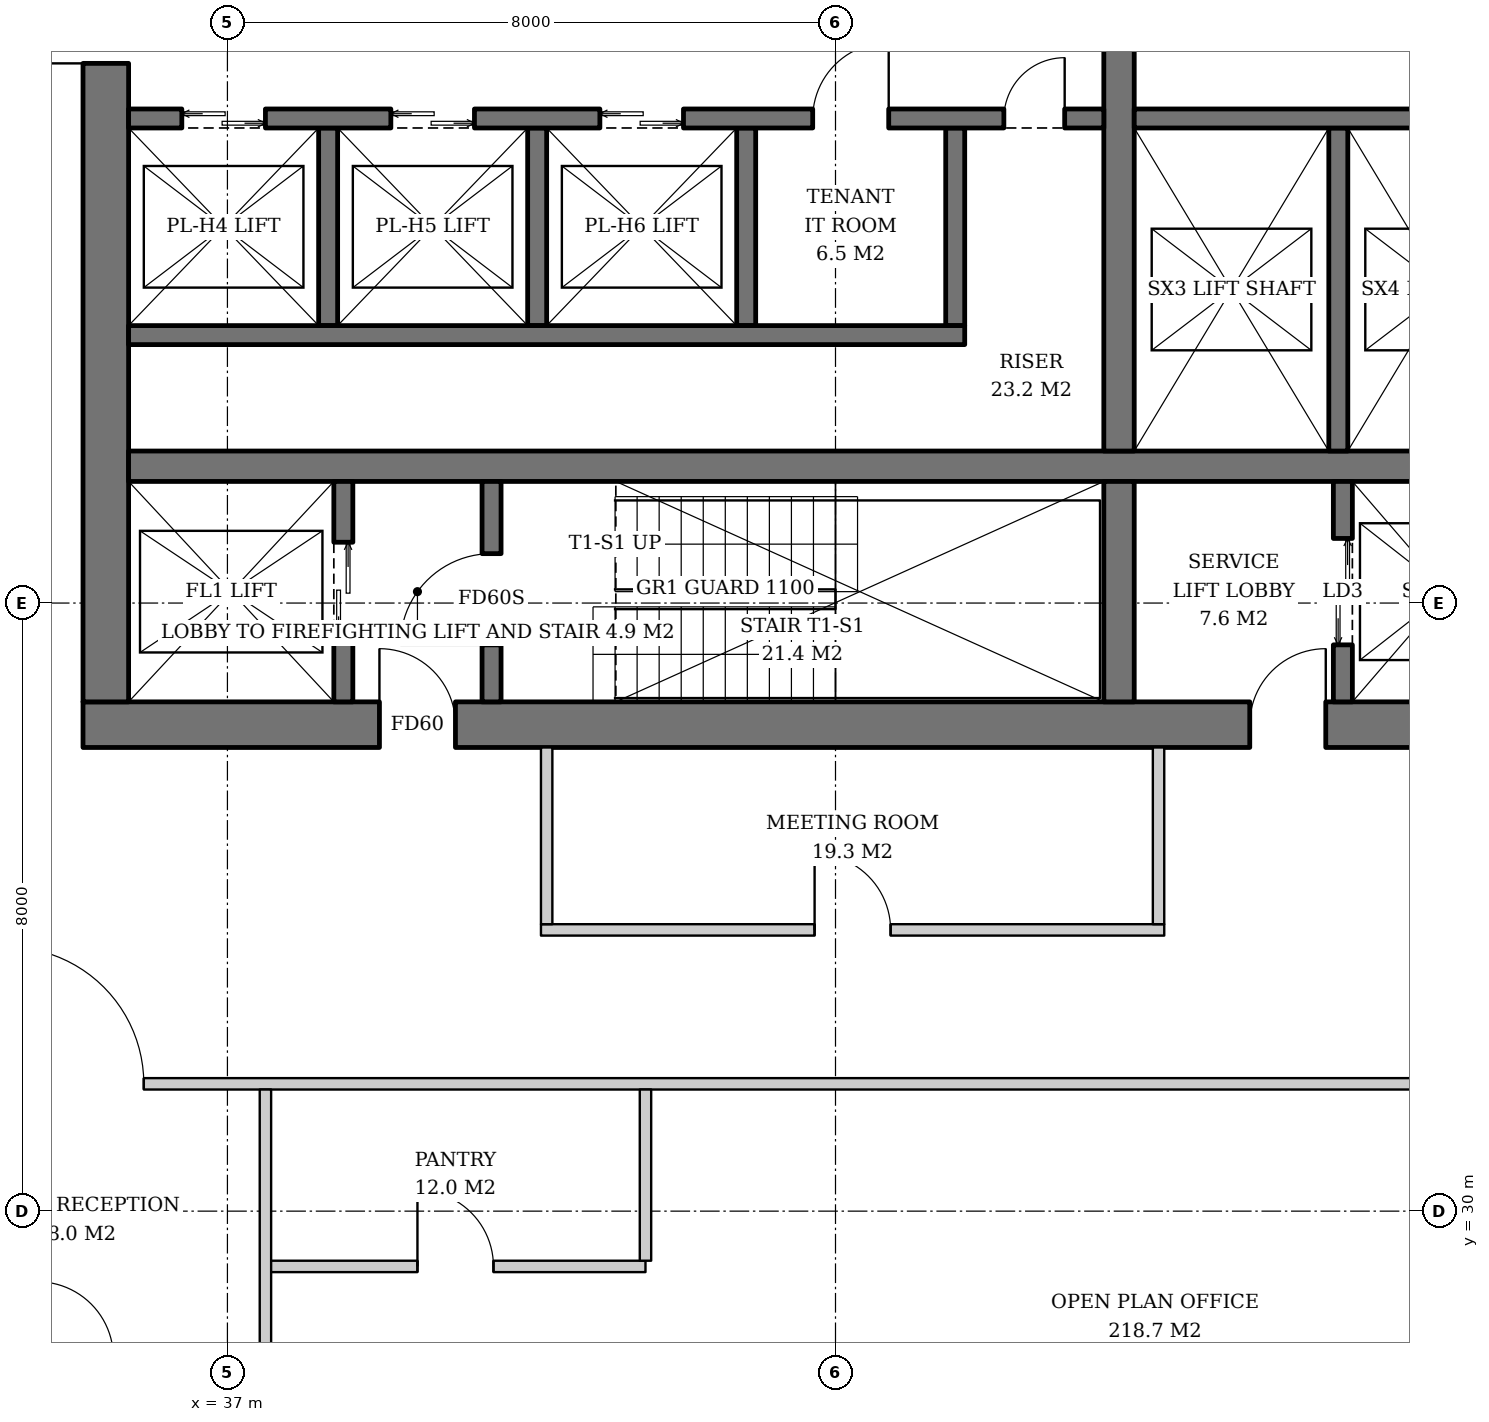
"""IFC4 building model, lengths in metres.
Left out: names, types, materials, properties, quantities, classifications, styles, units other than length and angle.
Written with IfcOpenShell. Run it as: python <this file> out.ifc"""

import sys

from ifc_helpers import new_model, si_unit, direction, frame, frame_2d, origin, place, context, subcontext, project, spatial, rectangle, extrude, element, fill, save


model = new_model("IFC4")
c1 = context("Model", 3, precision=1e-05, world=origin(), true_north=direction((0.0, 1.0)))
c2 = subcontext(c1, "Body", "Model", "MODEL_VIEW")
j1 = project(units=[si_unit("LENGTHUNIT", "METRE"), si_unit("PLANEANGLEUNIT", "RADIAN")], contexts=[c1])
p1 = place(None, origin())
s1 = spatial("IfcSite", under=j1, at=p1, CompositionType="ELEMENT")
p2 = place(p1, origin())
s2 = spatial("IfcBuilding", under=s1, at=p2, CompositionType="ELEMENT")
p3 = place(p2, frame((0.0, 0.0, 176.8)))
s3 = spatial("IfcBuildingStorey", under=s2, at=p3, CompositionType="ELEMENT", Elevation=176.8)
p4 = place(p3, frame((35.1, 36.4, 0.0), z_axis=(0.0, 0.0, 1.0), x_axis=(1.0, 0.0, 0.0)))
e1 = element("IfcWall", 1, at=p4, inside=s3, PredefinedType="SHEAR", context=c2, shape_type="SweptSolid", body=[
    extrude(rectangle(XDim=19.8, YDim=0.6, at=frame_2d((9.9, 0.0))), origin(), (0.0, 0.0, 1.0), 3.8),
])
p5 = place(p4, frame((3.9, 0.0, 0.0)))
e2 = element("IfcOpeningElement", 2, at=p5, cuts=e1, PredefinedType="OPENING", context=c2, shape_type="SweptSolid", body=[
    extrude(rectangle(XDim=1.0, YDim=2.1, at=frame_2d((0.5, 1.05))), frame((0.0, 0.31, 0.0), z_axis=(0.0, -1.0, 0.0), x_axis=(1.0, 0.0, 0.0)), (0.0, 0.0, 1.0), 0.62),
])
p6 = place(p4, frame((15.35, 0.0, 0.0)))
e3 = element("IfcOpeningElement", 3, at=p6, cuts=e1, PredefinedType="OPENING", context=c2, shape_type="SweptSolid", body=[
    extrude(rectangle(XDim=1.0, YDim=2.1, at=frame_2d((0.5, 1.05))), frame((0.0, 0.31, 0.0), z_axis=(0.0, -1.0, 0.0), x_axis=(1.0, 0.0, 0.0)), (0.0, 0.0, 1.0), 0.62),
])
p7 = place(p3, frame((35.4, 36.7, 0.0), z_axis=(0.0, 0.0, 1.0), x_axis=(0.0, 1.0, 0.0)))
e4 = element("IfcWall", 4, at=p7, inside=s3, PredefinedType="SHEAR", context=c2, shape_type="SweptSolid", body=[
    extrude(rectangle(XDim=18.6, YDim=0.6, at=frame_2d((9.3, 0.0))), origin(), (0.0, 0.0, 1.0), 3.8),
])
p8 = place(p7, frame((8.4, 0.0, 0.0)))
e5 = element("IfcOpeningElement", 5, at=p8, cuts=e4, PredefinedType="OPENING", context=c2, shape_type="SweptSolid", body=[
    extrude(rectangle(XDim=1.8, YDim=2.4, at=frame_2d((0.9, 1.2))), frame((0.0, 0.31, 0.0), z_axis=(0.0, -1.0, 0.0), x_axis=(1.0, 0.0, 0.0)), (0.0, 0.0, 1.0), 0.62),
])
p9 = place(p3, frame((35.7, 39.8, 0.0), z_axis=(0.0, 0.0, 1.0), x_axis=(1.0, 0.0, 0.0)))
e6 = element("IfcWall", 6, at=p9, inside=s3, PredefinedType="SHEAR", context=c2, shape_type="SweptSolid", body=[
    extrude(rectangle(XDim=18.6, YDim=0.4, at=frame_2d((9.3, 0.0))), origin(), (0.0, 0.0, 1.0), 3.8),
])
p10 = place(p3, frame((48.73, 36.7, 0.0), z_axis=(0.0, 0.0, 1.0), x_axis=(0.0, 1.0, 0.0)))
e7 = element("IfcWall", 7, at=p10, inside=s3, PredefinedType="SHEAR", context=c2, shape_type="SweptSolid", body=[
    extrude(rectangle(XDim=2.9, YDim=0.4, at=frame_2d((1.45, 0.0))), origin(), (0.0, 0.0, 1.0), 3.8),
])
p11 = place(p3, frame((48.73, 40.0, 0.0), z_axis=(0.0, 0.0, 1.0), x_axis=(0.0, 1.0, 0.0)))
e8 = element("IfcWall", 8, at=p11, inside=s3, PredefinedType="SHEAR", context=c2, shape_type="SweptSolid", body=[
    extrude(rectangle(XDim=12.0, YDim=0.4, at=frame_2d((6.0, 0.0))), origin(), (0.0, 0.0, 1.0), 3.8),
])
p12 = place(p3, frame((38.525, 36.7, 0.0), z_axis=(0.0, 0.0, 1.0), x_axis=(0.0, 1.0, 0.0)))
e9 = element("IfcWall", 9, at=p12, inside=s3, PredefinedType="SHEAR", context=c2, shape_type="SweptSolid", body=[
    extrude(rectangle(XDim=2.9, YDim=0.25, at=frame_2d((1.45, 0.0))), origin(), (0.0, 0.0, 1.0), 3.8),
])
p13 = place(p12, frame((0.8, 0.0, 0.0)))
e10 = element("IfcOpeningElement", 10, at=p13, cuts=e9, PredefinedType="OPENING", context=c2, shape_type="SweptSolid", body=[
    extrude(rectangle(XDim=1.3, YDim=2.2, at=frame_2d((0.65, 1.1))), frame((0.0, 0.135, 0.0), z_axis=(0.0, -1.0, 0.0), x_axis=(1.0, 0.0, 0.0)), (0.0, 0.0, 1.0), 0.27),
])
p14 = place(p3, frame((40.475, 36.7, 0.0), z_axis=(0.0, 0.0, 1.0), x_axis=(0.0, 1.0, 0.0)))
e11 = element("IfcWall", 11, at=p14, inside=s3, PredefinedType="SHEAR", context=c2, shape_type="SweptSolid", body=[
    extrude(rectangle(XDim=2.9, YDim=0.25, at=frame_2d((1.45, 0.0))), origin(), (0.0, 0.0, 1.0), 3.8),
])
p15 = place(p14, frame((0.75, 0.0, 0.0)))
e12 = element("IfcOpeningElement", 12, at=p15, cuts=e11, PredefinedType="OPENING", context=c2, shape_type="SweptSolid", body=[
    extrude(rectangle(XDim=1.2, YDim=2.1, at=frame_2d((0.6, 1.05))), frame((0.0, 0.135, 0.0), z_axis=(0.0, -1.0, 0.0), x_axis=(1.0, 0.0, 0.0)), (0.0, 0.0, 1.0), 0.27),
])
p16 = place(p3, frame((51.675, 36.7, 0.0), z_axis=(0.0, 0.0, 1.0), x_axis=(0.0, 1.0, 0.0)))
e13 = element("IfcWall", 13, at=p16, inside=s3, PredefinedType="SHEAR", context=c2, shape_type="SweptSolid", body=[
    extrude(rectangle(XDim=2.9, YDim=0.25, at=frame_2d((1.45, 0.0))), origin(), (0.0, 0.0, 1.0), 3.8),
])
p17 = place(p16, frame((0.75, 0.0, 0.0)))
e14 = element("IfcOpeningElement", 14, at=p17, cuts=e13, PredefinedType="OPENING", context=c2, shape_type="SweptSolid", body=[
    extrude(rectangle(XDim=1.4, YDim=2.4, at=frame_2d((0.7, 1.2))), frame((0.0, 0.135, 0.0), z_axis=(0.0, -1.0, 0.0), x_axis=(1.0, 0.0, 0.0)), (0.0, 0.0, 1.0), 0.27),
])
for number, where, z_axis, x_axis in (
    (15, (38.325, 44.25, 0.0), (0.0, 0.0, 1.0), (0.0, -1.0, 0.0)),
    (16, (41.075, 44.25, 0.0), (0.0, 0.0, 1.0), (0.0, -1.0, 0.0)),
    (17, (43.825, 44.25, 0.0), (0.0, 0.0, 1.0), (0.0, -1.0, 0.0)),
    (18, (46.575, 44.25, 0.0), (0.0, 0.0, 1.0), (0.0, -1.0, 0.0)),
):
    element("IfcWall", number, at=place(p3, frame(where, z_axis=z_axis, x_axis=x_axis)), inside=s3, PredefinedType="SHEAR", context=c2, shape_type="SweptSolid", body=[
        extrude(rectangle(XDim=2.6, YDim=0.25, at=frame_2d((1.3, 0.0))), origin(), (0.0, 0.0, 1.0), 3.8),
    ])
p18 = place(p3, frame((35.7, 41.525, 0.0), z_axis=(0.0, 0.0, 1.0), x_axis=(1.0, 0.0, 0.0)))
e19 = element("IfcWall", 19, at=p18, inside=s3, PredefinedType="SHEAR", context=c2, shape_type="SweptSolid", body=[
    extrude(rectangle(XDim=11.0, YDim=0.25, at=frame_2d((5.5, 0.0))), origin(), (0.0, 0.0, 1.0), 3.8),
])
p19 = place(p3, frame((35.7, 44.375, 0.0), z_axis=(0.0, 0.0, 1.0), x_axis=(1.0, 0.0, 0.0)))
e20 = element("IfcWall", 20, at=p19, inside=s3, PredefinedType="SHEAR", context=c2, shape_type="SweptSolid", body=[
    extrude(rectangle(XDim=12.83, YDim=0.25, at=frame_2d((6.415, 0.0))), origin(), (0.0, 0.0, 1.0), 3.8),
])
p20 = place(p19, frame((0.7, 0.0, 0.0)))
e21 = element("IfcOpeningElement", 21, at=p20, cuts=e20, PredefinedType="OPENING", context=c2, shape_type="SweptSolid", body=[
    extrude(rectangle(XDim=1.1, YDim=2.2, at=frame_2d((0.55, 1.1))), frame((0.0, 0.135, 0.0), z_axis=(0.0, -1.0, 0.0), x_axis=(1.0, 0.0, 0.0)), (0.0, 0.0, 1.0), 0.27),
])
p21 = place(p19, frame((3.45, 0.0, 0.0)))
e22 = element("IfcOpeningElement", 22, at=p21, cuts=e20, PredefinedType="OPENING", context=c2, shape_type="SweptSolid", body=[
    extrude(rectangle(XDim=1.1, YDim=2.2, at=frame_2d((0.55, 1.1))), frame((0.0, 0.135, 0.0), z_axis=(0.0, -1.0, 0.0), x_axis=(1.0, 0.0, 0.0)), (0.0, 0.0, 1.0), 0.27),
])
p22 = place(p19, frame((6.2, 0.0, 0.0)))
e23 = element("IfcOpeningElement", 23, at=p22, cuts=e20, PredefinedType="OPENING", context=c2, shape_type="SweptSolid", body=[
    extrude(rectangle(XDim=1.1, YDim=2.2, at=frame_2d((0.55, 1.1))), frame((0.0, 0.135, 0.0), z_axis=(0.0, -1.0, 0.0), x_axis=(1.0, 0.0, 0.0)), (0.0, 0.0, 1.0), 0.27),
])
p23 = place(p19, frame((9.0, 0.0, 0.0)))
e24 = element("IfcOpeningElement", 24, at=p23, cuts=e20, PredefinedType="OPENING", context=c2, shape_type="SweptSolid", body=[
    extrude(rectangle(XDim=1.0, YDim=2.1, at=frame_2d((0.5, 1.05))), frame((0.0, 0.135, 0.0), z_axis=(0.0, -1.0, 0.0), x_axis=(1.0, 0.0, 0.0)), (0.0, 0.0, 1.0), 0.27),
])
p24 = place(p19, frame((11.515, 0.0, 0.0)))
e25 = element("IfcOpeningElement", 25, at=p24, cuts=e20, PredefinedType="OPENING", context=c2, shape_type="SweptSolid", body=[
    extrude(rectangle(XDim=0.8, YDim=2.0, at=frame_2d((0.4, 1.0))), frame((0.0, 0.135, 0.0), z_axis=(0.0, -1.0, 0.0), x_axis=(1.0, 0.0, 0.0)), (0.0, 0.0, 1.0), 0.27),
])
p25 = place(p3, frame((51.615, 44.25, 0.0), z_axis=(0.0, 0.0, 1.0), x_axis=(0.0, -1.0, 0.0)))
e26 = element("IfcWall", 26, at=p25, inside=s3, PredefinedType="SHEAR", context=c2, shape_type="SweptSolid", body=[
    extrude(rectangle(XDim=4.25, YDim=0.25, at=frame_2d((2.125, 0.0))), origin(), (0.0, 0.0, 1.0), 3.8),
])
p26 = place(p3, frame((48.93, 44.375, 0.0), z_axis=(0.0, 0.0, 1.0), x_axis=(1.0, 0.0, 0.0)))
e27 = element("IfcWall", 27, at=p26, inside=s3, PredefinedType="SHEAR", context=c2, shape_type="SweptSolid", body=[
    extrude(rectangle(XDim=5.37, YDim=0.25, at=frame_2d((2.685, 0.0))), origin(), (0.0, 0.0, 1.0), 3.8),
])
p27 = place(p3, frame((41.125, 33.7, 0.0), z_axis=(0.0, 0.0, 1.0), x_axis=(1.0, 0.0, 0.0)))
e28 = element("IfcWall", 28, at=p27, inside=s3, PredefinedType="PARTITIONING", context=c2, shape_type="SweptSolid", body=[
    extrude(rectangle(XDim=8.2, YDim=0.15, at=frame_2d((4.1, 0.0))), origin(), (0.0, 0.0, 1.0), 2.867),
])
p28 = place(p27, frame((3.6, 0.0, 0.0)))
e29 = element("IfcOpeningElement", 29, at=p28, cuts=e28, PredefinedType="OPENING", context=c2, shape_type="SweptSolid", body=[
    extrude(rectangle(XDim=1.0, YDim=2.1, at=frame_2d((0.5, 1.05))), frame((0.0, 0.085, 0.0), z_axis=(0.0, -1.0, 0.0), x_axis=(1.0, 0.0, 0.0)), (0.0, 0.0, 1.0), 0.17),
])
for number, where, z_axis, x_axis in (
    (30, (41.2, 36.1, 0.0), (0.0, 0.0, 1.0), (0.0, -1.0, 0.0)),
    (31, (49.25, 36.1, 0.0), (0.0, 0.0, 1.0), (0.0, -1.0, 0.0)),
):
    element("IfcWall", number, at=place(p3, frame(where, z_axis=z_axis, x_axis=x_axis)), inside=s3, PredefinedType="PARTITIONING", context=c2, shape_type="SweptSolid", body=[
        extrude(rectangle(XDim=2.325, YDim=0.15, at=frame_2d((1.163, 0.0))), origin(), (0.0, 0.0, 1.0), 3.62),
    ])
p29 = place(p3, frame((31.214, 31.675, 0.0), z_axis=(0.0, 0.0, 1.0), x_axis=(1.0, 0.0, 0.0)))
e32 = element("IfcWall", 32, at=p29, inside=s3, PredefinedType="PARTITIONING", context=c2, shape_type="SweptSolid", body=[
    extrude(rectangle(XDim=27.572, YDim=0.15, at=frame_2d((13.786, 0.0))), origin(), (0.0, 0.0, 1.0), 2.867),
])
p30 = place(p29, frame((2.886, 0.0, 0.0)))
e33 = element("IfcOpeningElement", 33, at=p30, cuts=e32, PredefinedType="OPENING", context=c2, shape_type="SweptSolid", body=[
    extrude(rectangle(XDim=1.8, YDim=2.4, at=frame_2d((0.9, 1.2))), frame((0.0, 0.085, 0.0), z_axis=(0.0, -1.0, 0.0), x_axis=(1.0, 0.0, 0.0)), (0.0, 0.0, 1.0), 0.17),
])
p31 = place(p3, frame((37.5, 29.273, 0.0), z_axis=(0.0, 0.0, 1.0), x_axis=(1.0, 0.0, 0.0)))
e34 = element("IfcWall", 34, at=p31, inside=s3, PredefinedType="PARTITIONING", context=c2, shape_type="SweptSolid", body=[
    extrude(rectangle(XDim=5.0, YDim=0.15, at=frame_2d((2.5, 0.0))), origin(), (0.0, 0.0, 1.0), 2.867),
])
p32 = place(p31, frame((2.0, 0.0, 0.0)))
e35 = element("IfcOpeningElement", 35, at=p32, cuts=e34, PredefinedType="OPENING", context=c2, shape_type="SweptSolid", body=[
    extrude(rectangle(XDim=1.0, YDim=2.1, at=frame_2d((0.5, 1.05))), frame((0.0, 0.085, 0.0), z_axis=(0.0, -1.0, 0.0), x_axis=(1.0, 0.0, 0.0)), (0.0, 0.0, 1.0), 0.17),
])
p33 = place(p3, frame((37.5, 31.6, 0.0), z_axis=(0.0, 0.0, 1.0), x_axis=(0.0, -1.0, 0.0)))
e36 = element("IfcWall", 36, at=p33, inside=s3, PredefinedType="PARTITIONING", context=c2, shape_type="SweptSolid", body=[
    extrude(rectangle(XDim=3.454, YDim=0.15, at=frame_2d((1.727, 0.0))), origin(), (0.0, 0.0, 1.0), 3.62),
])
p34 = place(p3, frame((42.5, 31.6, 0.0), z_axis=(0.0, 0.0, 1.0), x_axis=(0.0, -1.0, 0.0)))
e37 = element("IfcWall", 37, at=p34, inside=s3, PredefinedType="PARTITIONING", context=c2, shape_type="SweptSolid", body=[
    extrude(rectangle(XDim=2.252, YDim=0.15, at=frame_2d((1.126, 0.0))), origin(), (0.0, 0.0, 1.0), 3.62),
])
p35 = place(p13, origin())
e38 = element("IfcDoor", 38, at=p35, inside=s3, OperationType="DOUBLE_DOOR_SLIDING", PredefinedType="DOOR", context=c2, shape_type="SweptSolid", body=[
    extrude(rectangle(XDim=1.3, YDim=2.2, at=frame_2d((0.65, 1.1))), frame((0.0, 0.025, 0.0), z_axis=(0.0, -1.0, 0.0), x_axis=(1.0, 0.0, 0.0)), (0.0, 0.0, 1.0), 0.05),
])
fill(e10, e38)
p36 = place(p15, origin())
e39 = element("IfcDoor", 39, at=p36, inside=s3, OperationType="SINGLE_SWING_LEFT", PredefinedType="DOOR", context=c2, shape_type="SweptSolid", body=[
    extrude(rectangle(XDim=1.2, YDim=2.1, at=frame_2d((0.6, 1.05))), frame((0.0, 0.025, 0.0), z_axis=(0.0, -1.0, 0.0), x_axis=(1.0, 0.0, 0.0)), (0.0, 0.0, 1.0), 0.05),
])
fill(e12, e39)
p37 = place(p17, origin())
e40 = element("IfcDoor", 40, at=p37, inside=s3, OperationType="DOUBLE_DOOR_SLIDING", PredefinedType="DOOR", context=c2, shape_type="SweptSolid", body=[
    extrude(rectangle(XDim=1.4, YDim=2.4, at=frame_2d((0.7, 1.2))), frame((0.0, 0.025, 0.0), z_axis=(0.0, -1.0, 0.0), x_axis=(1.0, 0.0, 0.0)), (0.0, 0.0, 1.0), 0.05),
])
fill(e14, e40)
p38 = place(p20, origin())
e41 = element("IfcDoor", 41, at=p38, inside=s3, OperationType="DOUBLE_DOOR_SLIDING", PredefinedType="DOOR", context=c2, shape_type="SweptSolid", body=[
    extrude(rectangle(XDim=1.1, YDim=2.2, at=frame_2d((0.55, 1.1))), frame((0.0, 0.025, 0.0), z_axis=(0.0, -1.0, 0.0), x_axis=(1.0, 0.0, 0.0)), (0.0, 0.0, 1.0), 0.05),
])
fill(e21, e41)
p39 = place(p21, origin())
e42 = element("IfcDoor", 42, at=p39, inside=s3, OperationType="DOUBLE_DOOR_SLIDING", PredefinedType="DOOR", context=c2, shape_type="SweptSolid", body=[
    extrude(rectangle(XDim=1.1, YDim=2.2, at=frame_2d((0.55, 1.1))), frame((0.0, 0.025, 0.0), z_axis=(0.0, -1.0, 0.0), x_axis=(1.0, 0.0, 0.0)), (0.0, 0.0, 1.0), 0.05),
])
fill(e22, e42)
p40 = place(p22, origin())
e43 = element("IfcDoor", 43, at=p40, inside=s3, OperationType="DOUBLE_DOOR_SLIDING", PredefinedType="DOOR", context=c2, shape_type="SweptSolid", body=[
    extrude(rectangle(XDim=1.1, YDim=2.2, at=frame_2d((0.55, 1.1))), frame((0.0, 0.025, 0.0), z_axis=(0.0, -1.0, 0.0), x_axis=(1.0, 0.0, 0.0)), (0.0, 0.0, 1.0), 0.05),
])
fill(e23, e43)
p41 = place(p23, origin())
e44 = element("IfcDoor", 44, at=p41, inside=s3, OperationType="SINGLE_SWING_RIGHT", PredefinedType="DOOR", context=c2, shape_type="SweptSolid", body=[
    extrude(rectangle(XDim=1.0, YDim=2.1, at=frame_2d((0.5, 1.05))), frame((0.0, 0.025, 0.0), z_axis=(0.0, -1.0, 0.0), x_axis=(1.0, 0.0, 0.0)), (0.0, 0.0, 1.0), 0.05),
])
fill(e24, e44)
p42 = place(p24, origin())
e45 = element("IfcDoor", 45, at=p42, inside=s3, OperationType="SINGLE_SWING_RIGHT", PredefinedType="DOOR", context=c2, shape_type="SweptSolid", body=[
    extrude(rectangle(XDim=0.8, YDim=2.0, at=frame_2d((0.4, 1.0))), frame((0.0, 0.025, 0.0), z_axis=(0.0, -1.0, 0.0), x_axis=(1.0, 0.0, 0.0)), (0.0, 0.0, 1.0), 0.05),
])
fill(e25, e45)
p43 = place(p5, origin())
e46 = element("IfcDoor", 46, at=p43, inside=s3, OperationType="SINGLE_SWING_LEFT", PredefinedType="DOOR", context=c2, shape_type="SweptSolid", body=[
    extrude(rectangle(XDim=1.0, YDim=2.1, at=frame_2d((0.5, 1.05))), frame((0.0, 0.025, 0.0), z_axis=(0.0, -1.0, 0.0), x_axis=(1.0, 0.0, 0.0)), (0.0, 0.0, 1.0), 0.05),
])
fill(e2, e46)
p44 = place(p8, origin())
e47 = element("IfcDoor", 47, at=p44, inside=s3, OperationType="DOUBLE_DOOR_SINGLE_SWING", PredefinedType="DOOR", context=c2, shape_type="SweptSolid", body=[
    extrude(rectangle(XDim=1.8, YDim=2.4, at=frame_2d((0.9, 1.2))), frame((0.0, 0.025, 0.0), z_axis=(0.0, -1.0, 0.0), x_axis=(1.0, 0.0, 0.0)), (0.0, 0.0, 1.0), 0.05),
])
fill(e5, e47)
p45 = place(p6, origin())
e48 = element("IfcDoor", 48, at=p45, inside=s3, OperationType="SINGLE_SWING_RIGHT", PredefinedType="DOOR", context=c2, shape_type="SweptSolid", body=[
    extrude(rectangle(XDim=1.0, YDim=2.1, at=frame_2d((0.5, 1.05))), frame((0.0, 0.025, 0.0), z_axis=(0.0, -1.0, 0.0), x_axis=(1.0, 0.0, 0.0)), (0.0, 0.0, 1.0), 0.05),
])
fill(e3, e48)
p46 = place(p28, origin())
e49 = element("IfcDoor", 49, at=p46, inside=s3, OperationType="SINGLE_SWING_LEFT", PredefinedType="DOOR", context=c2, shape_type="SweptSolid", body=[
    extrude(rectangle(XDim=1.0, YDim=2.1, at=frame_2d((0.5, 1.05))), frame((0.0, 0.025, 0.0), z_axis=(0.0, -1.0, 0.0), x_axis=(1.0, 0.0, 0.0)), (0.0, 0.0, 1.0), 0.05),
])
fill(e29, e49)
p47 = place(p30, origin())
e50 = element("IfcDoor", 50, at=p47, inside=s3, OperationType="DOUBLE_DOOR_SINGLE_SWING", PredefinedType="DOOR", context=c2, shape_type="SweptSolid", body=[
    extrude(rectangle(XDim=1.8, YDim=2.4, at=frame_2d((0.9, 1.2))), frame((0.0, 0.025, 0.0), z_axis=(0.0, -1.0, 0.0), x_axis=(1.0, 0.0, 0.0)), (0.0, 0.0, 1.0), 0.05),
])
fill(e33, e50)
p48 = place(p32, origin())
e51 = element("IfcDoor", 51, at=p48, inside=s3, OperationType="SINGLE_SWING_LEFT", PredefinedType="DOOR", context=c2, shape_type="SweptSolid", body=[
    extrude(rectangle(XDim=1.0, YDim=2.1, at=frame_2d((0.5, 1.05))), frame((0.0, 0.025, 0.0), z_axis=(0.0, -1.0, 0.0), x_axis=(1.0, 0.0, 0.0)), (0.0, 0.0, 1.0), 0.05),
])
fill(e35, e51)
save(model, sys.argv[1])
